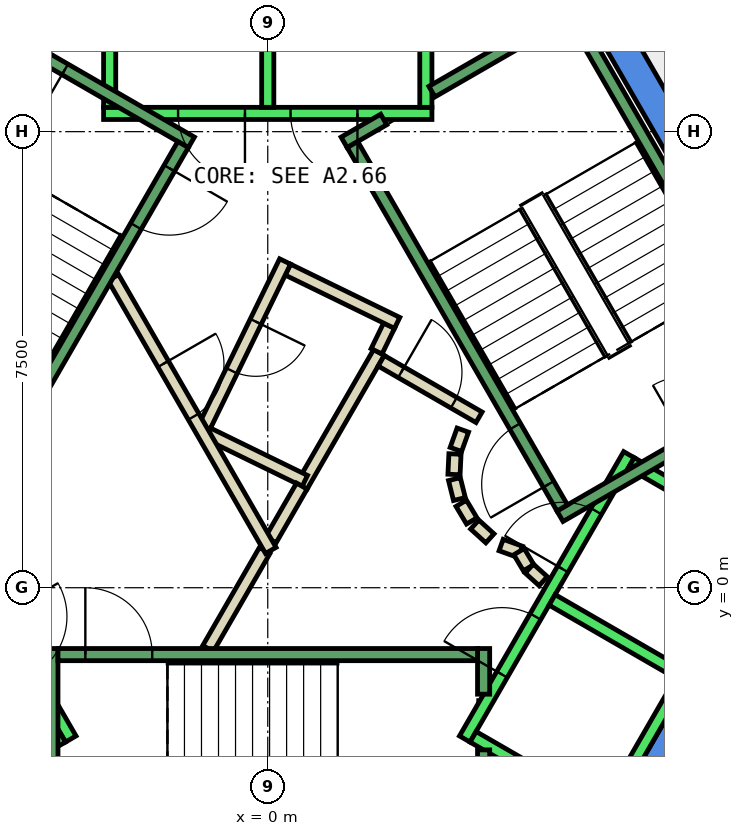
"""IFC4 building model, lengths in metres.
Left out: names, types, materials, properties, quantities, classifications, styles, units other than length and angle.
Written with IfcOpenShell. Run it as: python <this file> out.ifc"""

import sys

from ifc_helpers import new_model, si_unit, direction, frame, frame_2d, origin, place, context, subcontext, project, spatial, polyline, rectangle, outline, extrude, element, fill, save


model = new_model("IFC4")
c1 = context("Model", 3, precision=1e-05, world=origin(), true_north=direction((0.0, 1.0)))
c2 = subcontext(c1, "Body", "Model", "MODEL_VIEW")
j1 = project(units=[si_unit("LENGTHUNIT", "METRE"), si_unit("PLANEANGLEUNIT", "RADIAN")], contexts=[c1])
p1 = place(None, origin())
s1 = spatial("IfcSite", under=j1, at=p1, CompositionType="ELEMENT")
p2 = place(p1, origin())
s2 = spatial("IfcBuilding", under=s1, at=p2, CompositionType="ELEMENT")
p3 = place(p2, frame((0.0, 0.0, 311.6)))
s3 = spatial("IfcBuildingStorey", under=s2, at=p3, CompositionType="ELEMENT", Elevation=311.6)
p4 = place(p3, frame((0.0, 0.0, -0.34)))
e1 = element("IfcWall", 1, at=p4, inside=s3, PredefinedType="SHEAR", context=c2, shape_type="SweptSolid", body=[
    extrude(outline(polyline([(5.486, 9.998), (5.053, 9.748), (9.238, 2.5), (9.815, 2.5), (5.486, 9.998)])), origin(), (0.0, 0.0, 1.0), 3.6),
])
p5 = place(p3, frame((0.0, 0.0, -0.34)))
e2 = element("IfcWall", 2, at=p5, inside=s3, PredefinedType="SHEAR", context=c2, shape_type="SweptSolid", body=[
    extrude(outline(polyline([(4.907, -6.0), (9.815, 2.5), (9.238, 2.5), (4.619, -5.5), (4.907, -6.0)])), origin(), (0.0, 0.0, 1.0), 3.6),
])
p6 = place(p3, frame((0.56, 1.671, 0.0), z_axis=(0.0, 0.0, 1.0), x_axis=(0.500008334558, 0.866020591771, 0.0)))
e3 = element("IfcWall", 3, at=p6, inside=s3, PredefinedType="PARTITIONING", context=c2, shape_type="SweptSolid", body=[
    extrude(rectangle(XDim=2.538, YDim=0.2, at=frame_2d((1.269, 0.0))), origin(), (0.0, 0.0, 1.0), 3.26),
])
p7 = place(p3, frame((1.79, 3.888, 0.0), z_axis=(0.0, 0.0, 1.0), x_axis=(0.437807406823, 0.899068781869, 0.0)))
e4 = element("IfcWall", 4, at=p7, inside=s3, PredefinedType="PARTITIONING", context=c2, shape_type="SweptSolid", body=[
    extrude(rectangle(XDim=0.469, YDim=0.2, at=frame_2d((0.234, 0.0))), origin(), (0.0, 0.0, 1.0), 3.26),
])
p8 = place(p3, frame((2.128, 4.355, 0.0), z_axis=(0.0, 0.0, 1.0), x_axis=(-0.898876404494, 0.438202247191, 0.0)))
e5 = element("IfcWall", 5, at=p8, inside=s3, PredefinedType="PARTITIONING", context=c2, shape_type="SweptSolid", body=[
    extrude(rectangle(XDim=1.999, YDim=0.2, at=frame_2d((1.0, 0.0))), origin(), (0.0, 0.0, 1.0), 3.26),
])
p9 = place(p3, frame((0.285, 5.365, 0.0), z_axis=(0.0, 0.0, 1.0), x_axis=(-0.43840190643, -0.898779043168, 0.0)))
e6 = element("IfcWall", 6, at=p9, inside=s3, PredefinedType="PARTITIONING", context=c2, shape_type="SweptSolid", body=[
    extrude(rectangle(XDim=3.1, YDim=0.2, at=frame_2d((1.55, 0.0))), origin(), (0.0, 0.0, 1.0), 3.26),
])
p10 = place(p9, frame((1.1, 0.0, 0.0)))
e7 = element("IfcOpeningElement", 7, at=p10, cuts=e6, PredefinedType="OPENING", context=c2, shape_type="SweptSolid", body=[
    extrude(rectangle(XDim=0.9, YDim=2.1, at=frame_2d((0.45, 1.05))), frame((0.0, 0.11, 0.0), z_axis=(0.0, -1.0, 0.0), x_axis=(1.0, 0.0, 0.0)), (0.0, 0.0, 1.0), 0.22),
])
p11 = place(p3, frame((-0.984, 2.535, 0.0), z_axis=(0.0, 0.0, 1.0), x_axis=(0.898707583217, -0.438548378025, 0.0)))
e8 = element("IfcWall", 8, at=p11, inside=s3, PredefinedType="PARTITIONING", context=c2, shape_type="SweptSolid", body=[
    extrude(rectangle(XDim=1.774, YDim=0.2, at=frame_2d((0.887, 0.0))), origin(), (0.0, 0.0, 1.0), 3.26),
])
p12 = place(p3, frame((-0.982, -1.0, 0.0), z_axis=(0.0, 0.0, 1.0), x_axis=(0.50024047865, 0.865886518847, 0.0)))
e9 = element("IfcWall", 9, at=p12, inside=s3, PredefinedType="PARTITIONING", context=c2, shape_type="SweptSolid", body=[
    extrude(rectangle(XDim=1.863, YDim=0.2, at=frame_2d((0.931, 0.0))), origin(), (0.0, 0.0, 1.0), 3.26),
])
p13 = place(p3, frame((0.05, 0.787, 0.0), z_axis=(0.0, 0.0, 1.0), x_axis=(0.499819111317, 0.866129814729, 0.0)))
e10 = element("IfcWall", 10, at=p13, inside=s3, PredefinedType="PARTITIONING", context=c2, shape_type="SweptSolid", body=[
    extrude(rectangle(XDim=1.021, YDim=0.2, at=frame_2d((0.51, 0.0))), origin(), (0.0, 0.0, 1.0), 3.26),
])
p14 = place(p3, frame((1.866, 3.732, 0.0), z_axis=(0.0, 0.0, 1.0), x_axis=(0.866043361281, -0.499968895414, 0.0)))
e11 = element("IfcWall", 11, at=p14, inside=s3, PredefinedType="PARTITIONING", context=c2, shape_type="SweptSolid", body=[
    extrude(rectangle(XDim=1.858, YDim=0.2, at=frame_2d((0.929, 0.0))), origin(), (0.0, 0.0, 1.0), 3.26),
])
p15 = place(p14, frame((0.379, 0.0, 0.0)))
e12 = element("IfcOpeningElement", 12, at=p15, cuts=e11, PredefinedType="OPENING", context=c2, shape_type="SweptSolid", body=[
    extrude(rectangle(XDim=1.0, YDim=2.1, at=frame_2d((0.5, 1.05))), frame((0.0, 0.11, 0.0), z_axis=(0.0, -1.0, 0.0), x_axis=(1.0, 0.0, 0.0)), (0.0, 0.0, 1.0), 0.22),
])
p16 = place(p3, frame((3.208, 2.592, 0.0), z_axis=(0.0, 0.0, 1.0), x_axis=(-0.337388820924, -0.941365382578, 0.0)))
e13 = element("IfcWall", 13, at=p16, inside=s3, PredefinedType="PARTITIONING", context=c2, shape_type="SweptSolid", body=[
    extrude(rectangle(XDim=0.338, YDim=0.2, at=frame_2d((0.169, 0.0))), origin(), (0.0, 0.0, 1.0), 3.26),
])
p17 = place(p3, frame((3.079, 2.199, 0.0), z_axis=(0.0, 0.0, 1.0), x_axis=(-0.047771483479, -0.998858290933, 0.0)))
e14 = element("IfcWall", 14, at=p17, inside=s3, PredefinedType="PARTITIONING", context=c2, shape_type="SweptSolid", body=[
    extrude(rectangle(XDim=0.337, YDim=0.2, at=frame_2d((0.169, 0.0))), origin(), (0.0, 0.0, 1.0), 3.26),
])
p18 = place(p3, frame((3.07, 1.786, 0.0), z_axis=(0.0, 0.0, 1.0), x_axis=(0.242705583207, -0.970099994784, 0.0)))
e15 = element("IfcWall", 15, at=p18, inside=s3, PredefinedType="PARTITIONING", context=c2, shape_type="SweptSolid", body=[
    extrude(rectangle(XDim=0.338, YDim=0.2, at=frame_2d((0.169, 0.0))), origin(), (0.0, 0.0, 1.0), 3.26),
])
for number, where, z_axis, x_axis in (
    (16, (3.182, 1.388, 0.0), (0.0, 0.0, 1.0), (0.512, -0.859, 0.0)),
    (17, (3.404, 1.039, 0.0), (0.0, 0.0, 1.0), (0.74, -0.672, 0.0)),
):
    element("IfcWall", number, at=place(p3, frame(where, z_axis=z_axis, x_axis=x_axis)), inside=s3, PredefinedType="PARTITIONING", context=c2, shape_type="SweptSolid", body=[
        extrude(rectangle(XDim=0.338, YDim=0.2, at=frame_2d((0.169, 0.0))), origin(), (0.0, 0.0, 1.0), 3.26),
    ])
p19 = place(p3, frame((3.838, 0.702, 0.0), z_axis=(0.0, 0.0, 1.0), x_axis=(0.941035081519, -0.338308993895, 0.0)))
e18 = element("IfcWall", 18, at=p19, inside=s3, PredefinedType="PARTITIONING", context=c2, shape_type="SweptSolid", body=[
    extrude(rectangle(XDim=0.337, YDim=0.2, at=frame_2d((0.168, 0.0))), origin(), (0.0, 0.0, 1.0), 3.26),
])
p20 = place(p3, frame((4.132, 0.593, 0.0), z_axis=(0.0, 0.0, 1.0), x_axis=(0.513561617048, -0.858052717201, 0.0)))
e19 = element("IfcWall", 19, at=p20, inside=s3, PredefinedType="PARTITIONING", context=c2, shape_type="SweptSolid", body=[
    extrude(rectangle(XDim=0.308, YDim=0.2, at=frame_2d((0.154, 0.0))), origin(), (0.0, 0.0, 1.0), 3.26),
])
p21 = place(p3, frame((4.301, 0.315, 0.0), z_axis=(0.0, 0.0, 1.0), x_axis=(0.741798017506, -0.670623367639, 0.0)))
e20 = element("IfcWall", 20, at=p21, inside=s3, PredefinedType="PARTITIONING", context=c2, shape_type="SweptSolid", body=[
    extrude(rectangle(XDim=0.309, YDim=0.2, at=frame_2d((0.154, 0.0))), origin(), (0.0, 0.0, 1.0), 3.26),
])
p22 = place(p3, frame((-2.54, 5.1, 0.0), z_axis=(0.0, 0.0, 1.0), x_axis=(0.499925051871, -0.866068670783, 0.0)))
e21 = element("IfcWall", 21, at=p22, inside=s3, PredefinedType="PARTITIONING", context=c2, shape_type="SweptSolid", body=[
    extrude(rectangle(XDim=5.181, YDim=0.2, at=frame_2d((2.59, 0.0))), origin(), (0.0, 0.0, 1.0), 3.26),
])
p23 = place(p22, frame((1.64, 0.0, 0.0)))
e22 = element("IfcOpeningElement", 22, at=p23, cuts=e21, PredefinedType="OPENING", context=c2, shape_type="SweptSolid", body=[
    extrude(rectangle(XDim=1.0, YDim=2.1, at=frame_2d((0.5, 1.05))), frame((0.0, 0.11, 0.0), z_axis=(0.0, -1.0, 0.0), x_axis=(1.0, 0.0, 0.0)), (0.0, 0.0, 1.0), 0.22),
])
p24 = place(p3, frame((2.7, 7.8, 0.0), z_axis=(0.0, 0.0, 1.0), x_axis=(-1.0, 0.0, 0.0)))
e23 = element("IfcWall", 23, at=p24, inside=s3, PredefinedType="STANDARD", context=c2, shape_type="SweptSolid", body=[
    extrude(rectangle(XDim=5.4, YDim=0.2, at=frame_2d((2.7, 0.0))), origin(), (0.0, 0.0, 1.0), 3.26),
])
p25 = place(p24, frame((1.225, 0.0, 0.0)))
e24 = element("IfcOpeningElement", 24, at=p25, cuts=e23, PredefinedType="OPENING", context=c2, shape_type="SweptSolid", body=[
    extrude(rectangle(XDim=1.1, YDim=2.1, at=frame_2d((0.55, 1.05))), frame((0.0, 0.11, 0.0), z_axis=(0.0, -1.0, 0.0), x_axis=(1.0, 0.0, 0.0)), (0.0, 0.0, 1.0), 0.22),
])
p26 = place(p24, frame((3.075, 0.0, 0.0)))
e25 = element("IfcOpeningElement", 25, at=p26, cuts=e23, PredefinedType="OPENING", context=c2, shape_type="SweptSolid", body=[
    extrude(rectangle(XDim=1.1, YDim=2.1, at=frame_2d((0.55, 1.05))), frame((0.0, 0.11, 0.0), z_axis=(0.0, -1.0, 0.0), x_axis=(1.0, 0.0, 0.0)), (0.0, 0.0, 1.0), 0.22),
])
for number, where, z_axis, x_axis in (
    (26, (2.6, 7.9, 0.0), (0.0, 0.0, 1.0), (0.0, 1.0, 0.0)),
    (27, (0.0, 7.9, 0.0), (0.0, 0.0, 1.0), (0.0, 1.0, 0.0)),
    (28, (-2.6, 7.9, 0.0), (0.0, 0.0, 1.0), (0.0, 1.0, 0.0)),
):
    element("IfcWall", number, at=place(p3, frame(where, z_axis=z_axis, x_axis=x_axis)), inside=s3, PredefinedType="STANDARD", context=c2, shape_type="SweptSolid", body=[
        extrude(rectangle(XDim=2.4, YDim=0.2, at=frame_2d((1.2, 0.0))), origin(), (0.0, 0.0, 1.0), 3.26),
    ])
p27 = place(p3, frame((-5.94, 2.188, 0.0), z_axis=(0.0, 0.0, 1.0), x_axis=(0.500034260056, -0.866005622828, 0.0)))
e29 = element("IfcWall", 29, at=p27, inside=s3, PredefinedType="STANDARD", context=c2, shape_type="SweptSolid", body=[
    extrude(rectangle(XDim=5.399, YDim=0.2, at=frame_2d((2.7, 0.0))), origin(), (0.0, 0.0, 1.0), 3.26),
])
p28 = place(p27, frame((3.075, 0.0, 0.0)))
e30 = element("IfcOpeningElement", 30, at=p28, cuts=e29, PredefinedType="OPENING", context=c2, shape_type="SweptSolid", body=[
    extrude(rectangle(XDim=1.1, YDim=2.1, at=frame_2d((0.55, 1.05))), frame((0.0, 0.11, 0.0), z_axis=(0.0, -1.0, 0.0), x_axis=(1.0, 0.0, 0.0)), (0.0, 0.0, 1.0), 0.22),
])
p29 = place(p27, frame((1.225, 0.0, 0.0)))
e31 = element("IfcOpeningElement", 31, at=p29, cuts=e29, PredefinedType="OPENING", context=c2, shape_type="SweptSolid", body=[
    extrude(rectangle(XDim=1.1, YDim=2.1, at=frame_2d((0.55, 1.05))), frame((0.0, 0.11, 0.0), z_axis=(0.0, -1.0, 0.0), x_axis=(1.0, 0.0, 0.0)), (0.0, 0.0, 1.0), 0.22),
])
p30 = place(p3, frame((-3.377, -2.452, 0.0), z_axis=(0.0, 0.0, 1.0), x_axis=(-0.865955154139, -0.50012165622, 0.0)))
e32 = element("IfcWall", 32, at=p30, inside=s3, PredefinedType="STANDARD", context=c2, shape_type="SweptSolid", body=[
    extrude(rectangle(XDim=2.4, YDim=0.2, at=frame_2d((1.2, 0.0))), origin(), (0.0, 0.0, 1.0), 3.26),
])
p31 = place(p3, frame((3.24, -2.488, 0.0), z_axis=(0.0, 0.0, 1.0), x_axis=(0.500034260056, 0.866005622828, 0.0)))
e33 = element("IfcWall", 33, at=p31, inside=s3, PredefinedType="STANDARD", context=c2, shape_type="SweptSolid", body=[
    extrude(rectangle(XDim=5.399, YDim=0.2, at=frame_2d((2.7, 0.0))), origin(), (0.0, 0.0, 1.0), 3.26),
])
p32 = place(p31, frame((3.225, 0.0, 0.0)))
e34 = element("IfcOpeningElement", 34, at=p32, cuts=e33, PredefinedType="OPENING", context=c2, shape_type="SweptSolid", body=[
    extrude(rectangle(XDim=1.1, YDim=2.1, at=frame_2d((0.55, 1.05))), frame((0.0, 0.11, 0.0), z_axis=(0.0, -1.0, 0.0), x_axis=(1.0, 0.0, 0.0)), (0.0, 0.0, 1.0), 0.22),
])
p33 = place(p31, frame((1.225, 0.0, 0.0)))
e35 = element("IfcOpeningElement", 35, at=p33, cuts=e33, PredefinedType="OPENING", context=c2, shape_type="SweptSolid", body=[
    extrude(rectangle(XDim=1.1, YDim=2.1, at=frame_2d((0.55, 1.05))), frame((0.0, 0.11, 0.0), z_axis=(0.0, -1.0, 0.0), x_axis=(1.0, 0.0, 0.0)), (0.0, 0.0, 1.0), 0.22),
])
p34 = place(p3, frame((5.492, -3.788, 0.0), z_axis=(0.0, 0.0, 1.0), x_axis=(0.500034260056, 0.866005622828, 0.0)))
e36 = element("IfcWall", 36, at=p34, inside=s3, PredefinedType="STANDARD", context=c2, shape_type="SweptSolid", body=[
    extrude(rectangle(XDim=5.399, YDim=0.2, at=frame_2d((2.7, 0.0))), origin(), (0.0, 0.0, 1.0), 3.26),
])
p35 = place(p3, frame((3.377, -2.452, 0.0), z_axis=(0.0, 0.0, 1.0), x_axis=(0.865955154139, -0.50012165622, 0.0)))
e37 = element("IfcWall", 37, at=p35, inside=s3, PredefinedType="STANDARD", context=c2, shape_type="SweptSolid", body=[
    extrude(rectangle(XDim=2.4, YDim=0.2, at=frame_2d((1.2, 0.0))), origin(), (0.0, 0.0, 1.0), 3.26),
])
for number, where, z_axis, x_axis in (
    (38, (4.677, -0.2, 0.0), (0.0, 0.0, 1.0), (0.866, -0.5, 0.0)),
    (39, (5.977, 2.052, 0.0), (0.0, 0.0, 1.0), (0.866, -0.5, 0.0)),
):
    element("IfcWall", number, at=place(p3, frame(where, z_axis=z_axis, x_axis=x_axis)), inside=s3, PredefinedType="STANDARD", context=c2, shape_type="SweptSolid", body=[
        extrude(rectangle(XDim=2.399, YDim=0.2, at=frame_2d((1.2, 0.0))), origin(), (0.0, 0.0, 1.0), 3.26),
    ])
p36 = place(p3, frame((-3.55, -1.0, 0.0), z_axis=(0.0, 0.0, 1.0), x_axis=(0.0, -1.0, 0.0)))
e40 = element("IfcWall", 40, at=p36, inside=s3, PredefinedType="STANDARD", context=c2, shape_type="SweptSolid", body=[
    extrude(rectangle(XDim=4.4, YDim=0.2, at=frame_2d((2.2, 0.0))), origin(), (0.0, 0.0, 1.0), 3.26),
])
p37 = place(p36, frame((2.4, 0.0, 0.0)))
e41 = element("IfcOpeningElement", 41, at=p37, cuts=e40, PredefinedType="OPENING", context=c2, shape_type="SweptSolid", body=[
    extrude(rectangle(XDim=1.1, YDim=2.2, at=frame_2d((0.55, 1.1))), frame((0.0, 0.11, 0.0), z_axis=(0.0, -1.0, 0.0), x_axis=(1.0, 0.0, 0.0)), (0.0, 0.0, 1.0), 0.22),
])
p38 = place(p3, frame((3.55, -2.667, 0.0), z_axis=(0.0, 0.0, 1.0), x_axis=(0.0, -1.0, 0.0)))
e42 = element("IfcWall", 42, at=p38, inside=s3, PredefinedType="STANDARD", context=c2, shape_type="SweptSolid", body=[
    extrude(rectangle(XDim=2.733, YDim=0.2, at=frame_2d((1.366, 0.0))), origin(), (0.0, 0.0, 1.0), 3.26),
])
p39 = place(p3, frame((3.55, -1.0, 0.0), z_axis=(0.0, 0.0, 1.0), x_axis=(0.0, -1.0, 0.0)))
e43 = element("IfcWall", 43, at=p39, inside=s3, PredefinedType="STANDARD", context=c2, shape_type="SweptSolid", body=[
    extrude(rectangle(XDim=0.751, YDim=0.2, at=frame_2d((0.375, 0.0))), origin(), (0.0, 0.0, 1.0), 3.26),
])
p40 = place(p3, frame((-3.45, -1.1, 0.0), z_axis=(0.0, 0.0, 1.0), x_axis=(1.0, 0.0, 0.0)))
e44 = element("IfcWall", 44, at=p40, inside=s3, PredefinedType="STANDARD", context=c2, shape_type="SweptSolid", body=[
    extrude(rectangle(XDim=6.9, YDim=0.2, at=frame_2d((3.45, 0.0))), origin(), (0.0, 0.0, 1.0), 3.26),
])
p41 = place(p40, frame((0.45, 0.0, 0.0)))
e45 = element("IfcOpeningElement", 45, at=p41, cuts=e44, PredefinedType="OPENING", context=c2, shape_type="SweptSolid", body=[
    extrude(rectangle(XDim=1.1, YDim=2.2, at=frame_2d((0.55, 1.1))), frame((0.0, 0.11, 0.0), z_axis=(0.0, -1.0, 0.0), x_axis=(1.0, 0.0, 0.0)), (0.0, 0.0, 1.0), 0.22),
])
p42 = place(p3, frame((4.806, 1.176, 0.0), z_axis=(0.0, 0.0, 1.0), x_axis=(0.866059941101, 0.499940174841, 0.0)))
e46 = element("IfcWall", 46, at=p42, inside=s3, PredefinedType="STANDARD", context=c2, shape_type="SweptSolid", body=[
    extrude(rectangle(XDim=4.4, YDim=0.2, at=frame_2d((2.2, 0.0))), origin(), (0.0, 0.0, 1.0), 3.26),
])
p43 = place(p42, frame((2.4, 0.0, 0.0)))
e47 = element("IfcOpeningElement", 47, at=p43, cuts=e46, PredefinedType="OPENING", context=c2, shape_type="SweptSolid", body=[
    extrude(rectangle(XDim=1.1, YDim=2.2, at=frame_2d((0.55, 1.1))), frame((0.0, 0.11, 0.0), z_axis=(0.0, -1.0, 0.0), x_axis=(1.0, 0.0, 0.0)), (0.0, 0.0, 1.0), 0.22),
])
p44 = place(p3, frame((2.7, 8.158, 0.0), z_axis=(0.0, 0.0, 1.0), x_axis=(0.86611865017, 0.499838457731, 0.0)))
e48 = element("IfcWall", 48, at=p44, inside=s3, PredefinedType="STANDARD", context=c2, shape_type="SweptSolid", body=[
    extrude(rectangle(XDim=2.733, YDim=0.2, at=frame_2d((1.366, 0.0))), origin(), (0.0, 0.0, 1.0), 3.26),
])
p45 = place(p3, frame((1.256, 7.324, 0.0), z_axis=(0.0, 0.0, 1.0), x_axis=(0.865915093549, 0.500191014278, 0.0)))
e49 = element("IfcWall", 49, at=p45, inside=s3, PredefinedType="STANDARD", context=c2, shape_type="SweptSolid", body=[
    extrude(rectangle(XDim=0.752, YDim=0.2, at=frame_2d((0.376, 0.0))), origin(), (0.0, 0.0, 1.0), 3.26),
])
p46 = place(p3, frame((4.843, 1.312, 0.0), z_axis=(0.0, 0.0, 1.0), x_axis=(-0.499963383562, 0.866046543262, 0.0)))
e50 = element("IfcWall", 50, at=p46, inside=s3, PredefinedType="STANDARD", context=c2, shape_type="SweptSolid", body=[
    extrude(rectangle(XDim=6.9, YDim=0.2, at=frame_2d((3.45, 0.0))), origin(), (0.0, 0.0, 1.0), 3.26),
])
p47 = place(p46, frame((0.45, 0.0, 0.0)))
e51 = element("IfcOpeningElement", 51, at=p47, cuts=e50, PredefinedType="OPENING", context=c2, shape_type="SweptSolid", body=[
    extrude(rectangle(XDim=1.1, YDim=2.2, at=frame_2d((0.55, 1.1))), frame((0.0, 0.11, 0.0), z_axis=(0.0, -1.0, 0.0), x_axis=(1.0, 0.0, 0.0)), (0.0, 0.0, 1.0), 0.22),
])
p48 = place(p3, frame((8.48, 3.412, 0.0), z_axis=(0.0, 0.0, 1.0), x_axis=(-0.499978703459, 0.866037698999, 0.0)))
e52 = element("IfcWall", 52, at=p48, inside=s3, PredefinedType="STANDARD", context=c2, shape_type="SweptSolid", body=[
    extrude(rectangle(XDim=6.9, YDim=0.2, at=frame_2d((3.45, 0.0))), origin(), (0.0, 0.0, 1.0), 3.26),
])
p49 = place(p3, frame((-1.256, 7.324, 0.0), z_axis=(0.0, 0.0, 1.0), x_axis=(-0.866046073146, 0.499964197906, 0.0)))
e53 = element("IfcWall", 53, at=p49, inside=s3, PredefinedType="STANDARD", context=c2, shape_type="SweptSolid", body=[
    extrude(rectangle(XDim=4.4, YDim=0.2, at=frame_2d((2.2, 0.0))), origin(), (0.0, 0.0, 1.0), 3.26),
])
p50 = place(p49, frame((2.4, 0.0, 0.0)))
e54 = element("IfcOpeningElement", 54, at=p50, cuts=e53, PredefinedType="OPENING", context=c2, shape_type="SweptSolid", body=[
    extrude(rectangle(XDim=1.1, YDim=2.2, at=frame_2d((0.55, 1.1))), frame((0.0, 0.11, 0.0), z_axis=(0.0, -1.0, 0.0), x_axis=(1.0, 0.0, 0.0)), (0.0, 0.0, 1.0), 0.22),
])
p51 = place(p3, frame((-1.393, 7.288, 0.0), z_axis=(0.0, 0.0, 1.0), x_axis=(-0.499963383562, -0.866046543262, 0.0)))
e55 = element("IfcWall", 55, at=p51, inside=s3, PredefinedType="STANDARD", context=c2, shape_type="SweptSolid", body=[
    extrude(rectangle(XDim=6.9, YDim=0.2, at=frame_2d((3.45, 0.0))), origin(), (0.0, 0.0, 1.0), 3.26),
])
p52 = place(p51, frame((0.45, 0.0, 0.0)))
e56 = element("IfcOpeningElement", 56, at=p52, cuts=e55, PredefinedType="OPENING", context=c2, shape_type="SweptSolid", body=[
    extrude(rectangle(XDim=1.1, YDim=2.2, at=frame_2d((0.55, 1.1))), frame((0.0, 0.11, 0.0), z_axis=(0.0, -1.0, 0.0), x_axis=(1.0, 0.0, 0.0)), (0.0, 0.0, 1.0), 0.22),
])
p53 = place(p15, origin())
e57 = element("IfcDoor", 57, at=p53, inside=s3, OperationType="SINGLE_SWING_LEFT", PredefinedType="DOOR", context=c2, shape_type="SweptSolid", body=[
    extrude(rectangle(XDim=1.0, YDim=2.1, at=frame_2d((0.5, 1.05))), frame((0.0, 0.025, 0.0), z_axis=(0.0, -1.0, 0.0), x_axis=(1.0, 0.0, 0.0)), (0.0, 0.0, 1.0), 0.05),
])
fill(e12, e57)
p54 = place(p23, origin())
e58 = element("IfcDoor", 58, at=p54, inside=s3, OperationType="SINGLE_SWING_RIGHT", PredefinedType="DOOR", context=c2, shape_type="SweptSolid", body=[
    extrude(rectangle(XDim=1.0, YDim=2.1, at=frame_2d((0.5, 1.05))), frame((0.0, 0.025, 0.0), z_axis=(0.0, -1.0, 0.0), x_axis=(1.0, 0.0, 0.0)), (0.0, 0.0, 1.0), 0.05),
])
fill(e22, e58)
p55 = place(p10, origin())
e59 = element("IfcDoor", 59, at=p55, inside=s3, OperationType="SINGLE_SWING_RIGHT", PredefinedType="DOOR", context=c2, shape_type="SweptSolid", body=[
    extrude(rectangle(XDim=0.9, YDim=2.1, at=frame_2d((0.45, 1.05))), frame((0.0, 0.025, 0.0), z_axis=(0.0, -1.0, 0.0), x_axis=(1.0, 0.0, 0.0)), (0.0, 0.0, 1.0), 0.05),
])
fill(e7, e59)
p56 = place(p25, origin())
e60 = element("IfcDoor", 60, at=p56, inside=s3, OperationType="SLIDING_TO_LEFT", PredefinedType="DOOR", context=c2, shape_type="SweptSolid", body=[
    extrude(rectangle(XDim=1.1, YDim=2.1, at=frame_2d((0.55, 1.05))), frame((0.0, 0.025, 0.0), z_axis=(0.0, -1.0, 0.0), x_axis=(1.0, 0.0, 0.0)), (0.0, 0.0, 1.0), 0.05),
])
fill(e24, e60)
p57 = place(p26, origin())
e61 = element("IfcDoor", 61, at=p57, inside=s3, OperationType="SLIDING_TO_LEFT", PredefinedType="DOOR", context=c2, shape_type="SweptSolid", body=[
    extrude(rectangle(XDim=1.1, YDim=2.1, at=frame_2d((0.55, 1.05))), frame((0.0, 0.025, 0.0), z_axis=(0.0, -1.0, 0.0), x_axis=(1.0, 0.0, 0.0)), (0.0, 0.0, 1.0), 0.05),
])
fill(e25, e61)
p58 = place(p32, origin())
e62 = element("IfcDoor", 62, at=p58, inside=s3, OperationType="SLIDING_TO_LEFT", PredefinedType="DOOR", context=c2, shape_type="SweptSolid", body=[
    extrude(rectangle(XDim=1.1, YDim=2.1, at=frame_2d((0.55, 1.05))), frame((0.0, 0.025, 0.0), z_axis=(0.0, -1.0, 0.0), x_axis=(1.0, 0.0, 0.0)), (0.0, 0.0, 1.0), 0.05),
])
fill(e34, e62)
p59 = place(p33, origin())
e63 = element("IfcDoor", 63, at=p59, inside=s3, OperationType="SLIDING_TO_LEFT", PredefinedType="DOOR", context=c2, shape_type="SweptSolid", body=[
    extrude(rectangle(XDim=1.1, YDim=2.1, at=frame_2d((0.55, 1.05))), frame((0.0, 0.025, 0.0), z_axis=(0.0, -1.0, 0.0), x_axis=(1.0, 0.0, 0.0)), (0.0, 0.0, 1.0), 0.05),
])
fill(e35, e63)
p60 = place(p41, origin())
e64 = element("IfcDoor", 64, at=p60, inside=s3, OperationType="SINGLE_SWING_LEFT", PredefinedType="DOOR", context=c2, shape_type="SweptSolid", body=[
    extrude(rectangle(XDim=1.1, YDim=2.2, at=frame_2d((0.55, 1.1))), frame((0.0, 0.025, 0.0), z_axis=(0.0, -1.0, 0.0), x_axis=(1.0, 0.0, 0.0)), (0.0, 0.0, 1.0), 0.05),
])
fill(e45, e64)
p61 = place(p47, origin())
e65 = element("IfcDoor", 65, at=p61, inside=s3, OperationType="SINGLE_SWING_LEFT", PredefinedType="DOOR", context=c2, shape_type="SweptSolid", body=[
    extrude(rectangle(XDim=1.1, YDim=2.2, at=frame_2d((0.55, 1.1))), frame((0.0, 0.025, 0.0), z_axis=(0.0, -1.0, 0.0), x_axis=(1.0, 0.0, 0.0)), (0.0, 0.0, 1.0), 0.05),
])
fill(e51, e65)
p62 = place(p52, origin())
e66 = element("IfcDoor", 66, at=p62, inside=s3, OperationType="SINGLE_SWING_LEFT", PredefinedType="DOOR", context=c2, shape_type="SweptSolid", body=[
    extrude(rectangle(XDim=1.1, YDim=2.2, at=frame_2d((0.55, 1.1))), frame((0.0, 0.025, 0.0), z_axis=(0.0, -1.0, 0.0), x_axis=(1.0, 0.0, 0.0)), (0.0, 0.0, 1.0), 0.05),
])
fill(e56, e66)
p63 = place(p50, origin())
e67 = element("IfcDoor", 67, at=p63, inside=s3, OperationType="SINGLE_SWING_LEFT", PredefinedType="DOOR", context=c2, shape_type="SweptSolid", body=[
    extrude(rectangle(XDim=1.1, YDim=2.2, at=frame_2d((0.55, 1.1))), frame((0.0, 0.025, 0.0), z_axis=(0.0, -1.0, 0.0), x_axis=(1.0, 0.0, 0.0)), (0.0, 0.0, 1.0), 0.05),
])
fill(e54, e67)
save(model, sys.argv[1])
